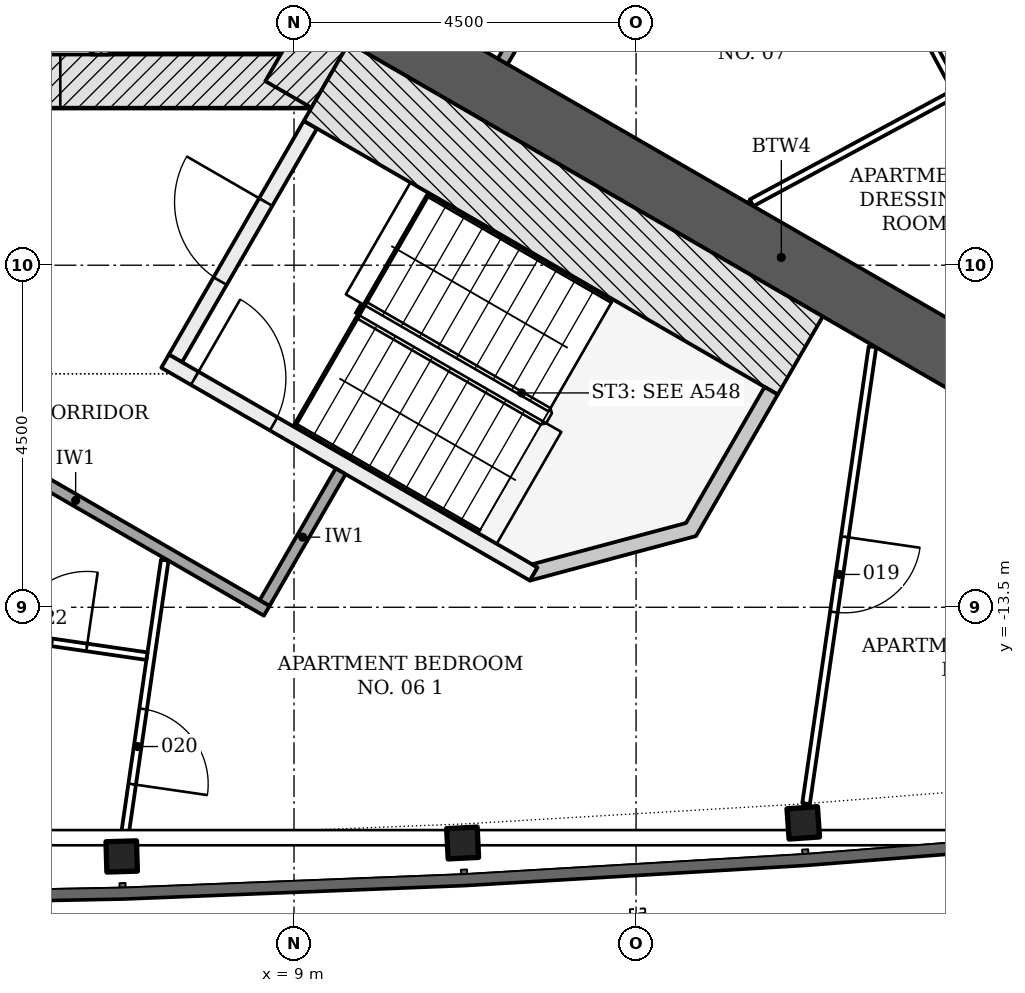
"""IFC4 building model, lengths in metres.
Left out: names, types, materials, properties, quantities, classifications, styles, units other than length and angle.
Written with IfcOpenShell. Run it as: python <this file> out.ifc"""

import sys

from ifc_helpers import new_model, si_unit, direction, frame, frame_2d, origin, origin_2d, place, context, subcontext, project, spatial, polyline, rectangle, i_section, outline, extrude, element, fill, save


model = new_model("IFC4")
c1 = context("Model", 3, precision=1e-05, world=origin(), true_north=direction((0.0, 1.0)))
c2 = subcontext(c1, "Body", "Model", "MODEL_VIEW")
j1 = project(units=[si_unit("LENGTHUNIT", "METRE"), si_unit("PLANEANGLEUNIT", "RADIAN")], contexts=[c1])
p1 = place(None, origin())
s1 = spatial("IfcSite", under=j1, at=p1, CompositionType="ELEMENT")
p2 = place(p1, origin())
s2 = spatial("IfcBuilding", under=s1, at=p2, CompositionType="ELEMENT")
p3 = place(p2, frame((0.0, 0.0, 91.5)))
s3 = spatial("IfcBuildingStorey", under=s2, at=p3, CompositionType="ELEMENT", Elevation=91.5)
p4 = place(p3, frame((-9.229, -6.578, -0.2), z_axis=(0.0, 0.0, 1.0), x_axis=(1.0, 0.0, 0.0)))
e1 = element("IfcWall", 1, at=p4, inside=s3, PredefinedType="SHEAR", context=c2, shape_type="SweptSolid", body=[
    extrude(rectangle(XDim=18.458, YDim=0.7, at=frame_2d((9.229, 0.0))), origin(), (0.0, 0.0, 1.0), 3.6),
])
p5 = place(p4, frame((3.304, 0.0, 0.2)))
e2 = element("IfcOpeningElement", 2, at=p5, cuts=e1, PredefinedType="OPENING", context=c2, shape_type="SweptSolid", body=[
    extrude(rectangle(XDim=1.1, YDim=2.1, at=frame_2d((0.55, 1.05))), frame((0.0, 0.36, 0.0), z_axis=(0.0, -1.0, 0.0), x_axis=(1.0, 0.0, 0.0)), (0.0, 0.0, 1.0), 0.72),
])
p6 = place(p4, frame((5.454, 0.0, 0.2)))
e3 = element("IfcOpeningElement", 3, at=p6, cuts=e1, PredefinedType="OPENING", context=c2, shape_type="SweptSolid", body=[
    extrude(rectangle(XDim=1.1, YDim=2.1, at=frame_2d((0.55, 1.05))), frame((0.0, 0.36, 0.0), z_axis=(0.0, -1.0, 0.0), x_axis=(1.0, 0.0, 0.0)), (0.0, 0.0, 1.0), 0.72),
])
p7 = place(p4, frame((7.604, 0.0, 0.2)))
e4 = element("IfcOpeningElement", 4, at=p7, cuts=e1, PredefinedType="OPENING", context=c2, shape_type="SweptSolid", body=[
    extrude(rectangle(XDim=1.1, YDim=2.1, at=frame_2d((0.55, 1.05))), frame((0.0, 0.36, 0.0), z_axis=(0.0, -1.0, 0.0), x_axis=(1.0, 0.0, 0.0)), (0.0, 0.0, 1.0), 0.72),
])
p8 = place(p4, frame((9.754, 0.0, 0.2)))
e5 = element("IfcOpeningElement", 5, at=p8, cuts=e1, PredefinedType="OPENING", context=c2, shape_type="SweptSolid", body=[
    extrude(rectangle(XDim=1.1, YDim=2.1, at=frame_2d((0.55, 1.05))), frame((0.0, 0.36, 0.0), z_axis=(0.0, -1.0, 0.0), x_axis=(1.0, 0.0, 0.0)), (0.0, 0.0, 1.0), 0.72),
])
p9 = place(p4, frame((11.904, 0.0, 0.2)))
e6 = element("IfcOpeningElement", 6, at=p9, cuts=e1, PredefinedType="OPENING", context=c2, shape_type="SweptSolid", body=[
    extrude(rectangle(XDim=1.1, YDim=2.1, at=frame_2d((0.55, 1.05))), frame((0.0, 0.36, 0.0), z_axis=(0.0, -1.0, 0.0), x_axis=(1.0, 0.0, 0.0)), (0.0, 0.0, 1.0), 0.72),
])
p10 = place(p4, frame((14.054, 0.0, 0.2)))
e7 = element("IfcOpeningElement", 7, at=p10, cuts=e1, PredefinedType="OPENING", context=c2, shape_type="SweptSolid", body=[
    extrude(rectangle(XDim=1.1, YDim=2.1, at=frame_2d((0.55, 1.05))), frame((0.0, 0.36, 0.0), z_axis=(0.0, -1.0, 0.0), x_axis=(1.0, 0.0, 0.0)), (0.0, 0.0, 1.0), 0.72),
])
p11 = place(p4, frame((1.079, 0.0, 0.2)))
e8 = element("IfcOpeningElement", 8, at=p11, cuts=e1, PredefinedType="OPENING", context=c2, shape_type="SweptSolid", body=[
    extrude(rectangle(XDim=0.9, YDim=2.1, at=frame_2d((0.45, 1.05))), frame((0.0, 0.36, 0.0), z_axis=(0.0, -1.0, 0.0), x_axis=(1.0, 0.0, 0.0)), (0.0, 0.0, 1.0), 0.72),
])
p12 = place(p3, frame((8.926, -6.753, -0.2), z_axis=(0.0, 0.0, 1.0), x_axis=(0.500042739161, 0.866000726912, 0.0)))
e9 = element("IfcWall", 9, at=p12, inside=s3, PredefinedType="SHEAR", context=c2, shape_type="SweptSolid", body=[
    extrude(rectangle(XDim=2.771, YDim=0.7, at=frame_2d((1.386, 0.0))), origin(), (0.0, 0.0, 1.0), 3.6),
])
p13 = place(p3, frame((9.922, -5.728, -0.2), z_axis=(0.0, 0.0, 1.0), x_axis=(0.866029086277, -0.499993621681, 0.0)))
e10 = element("IfcWall", 10, at=p13, inside=s3, PredefinedType="SHEAR", context=c2, shape_type="SweptSolid", body=[
    extrude(rectangle(XDim=12.677, YDim=0.8, at=frame_2d((6.339, 0.0))), origin(), (0.0, 0.0, 1.0), 3.6),
])
for number, where, z_axis, x_axis in (
    (11, (6.733, -16.778, -0.2), (0.0, 0.0, 1.0), (1.0, 0.03, 0.0)),
    (12, (11.219, -16.601, -0.2), (0.0, 0.0, 1.0), (0.999, 0.049, 0.0)),
    (13, (15.7, -16.336, -0.2), (0.0, 0.0, 1.0), (0.998, 0.069, 0.0)),
):
    element("IfcColumn", number, at=place(p3, frame(where, z_axis=z_axis, x_axis=x_axis)), inside=s3, PredefinedType="COLUMN", context=c2, shape_type="SweptSolid", body=[
        extrude(i_section(OverallWidth=0.401, OverallDepth=0.399, WebThickness=0.025, FlangeThickness=0.04, FilletRadius=0.015, at=origin_2d()), origin(), (0.0, 0.0, 1.0), 3.6),
    ])
p14 = place(p3, frame((6.45, -6.228, -0.2), z_axis=(0.0, 0.0, 1.0), x_axis=(0.0, 1.0, 0.0)))
e14 = element("IfcWall", 14, at=p14, inside=s3, PredefinedType="PARTITIONING", context=c2, shape_type="SweptSolid", body=[
    extrude(rectangle(XDim=2.5, YDim=0.25, at=frame_2d((1.25, 0.0))), origin(), (0.0, 0.0, 1.0), 3.6),
])
p15 = place(p3, frame((7.44, -10.226, -0.2), z_axis=(0.0, 0.0, 1.0), x_axis=(0.500022077904, 0.866012656725, 0.0)))
e15 = element("IfcWall", 15, at=p15, inside=s3, PredefinedType="SHEAR", context=c2, shape_type="SweptSolid", body=[
    extrude(rectangle(XDim=3.55, YDim=0.2, at=frame_2d((1.775, 0.0))), origin(), (0.0, 0.0, 1.0), 3.6),
])
p16 = place(p15, frame((1.175, 0.0, 0.2)))
e16 = element("IfcOpeningElement", 16, at=p16, cuts=e15, PredefinedType="OPENING", context=c2, shape_type="SweptSolid", body=[
    extrude(rectangle(XDim=1.2, YDim=2.1, at=frame_2d((0.6, 1.05))), frame((0.0, 0.11, 0.0), z_axis=(0.0, -1.0, 0.0), x_axis=(1.0, 0.0, 0.0)), (0.0, 0.0, 1.0), 0.22),
])
p17 = place(p3, frame((7.304, -10.262, -0.2), z_axis=(0.0, 0.0, 1.0), x_axis=(0.866026594901, -0.49999793692, 0.0)))
e17 = element("IfcWall", 17, at=p17, inside=s3, PredefinedType="SHEAR", context=c2, shape_type="SweptSolid", body=[
    extrude(rectangle(XDim=5.6, YDim=0.2, at=frame_2d((2.8, 0.0))), origin(), (0.0, 0.0, 1.0), 3.6),
])
p18 = place(p17, frame((0.45, 0.0, 0.2)))
e18 = element("IfcOpeningElement", 18, at=p18, cuts=e17, PredefinedType="OPENING", context=c2, shape_type="SweptSolid", body=[
    extrude(rectangle(XDim=1.2, YDim=2.1, at=frame_2d((0.6, 1.05))), frame((0.0, 0.11, 0.0), z_axis=(0.0, -1.0, 0.0), x_axis=(1.0, 0.0, 0.0)), (0.0, 0.0, 1.0), 0.22),
])
p19 = place(p3, frame((9.425, -6.588, -0.2), z_axis=(0.0, 0.0, 1.0), x_axis=(0.866018442252, -0.500012057535, 0.0)))
e19 = element("IfcWall", 19, at=p19, inside=s3, PredefinedType="SHEAR", context=c2, shape_type="SweptSolid", body=[
    extrude(rectangle(XDim=7.2, YDim=1.186, at=frame_2d((3.6, 0.0))), origin(), (0.0, 0.0, 1.0), 3.6),
])
p20 = place(p3, frame((0.0, 0.0, -0.2)))
e20 = element("IfcWall", 20, at=p20, inside=s3, PredefinedType="SHEAR", context=c2, shape_type="SweptSolid", body=[
    extrude(outline(polyline([(12.104, -13.149), (14.289, -12.563), (15.364, -10.701), (15.191, -10.601), (14.157, -12.392), (12.132, -12.934), (12.204, -12.976), (12.204, -12.976), (12.204, -12.976), (12.204, -12.976), (12.204, -12.976), (12.204, -12.976), (12.204, -12.976), (12.204, -12.976), (12.204, -12.976), (12.204, -12.976), (12.204, -12.976), (12.204, -12.976), (12.204, -12.976), (12.204, -12.976), (12.204, -12.976), (12.204, -12.976), (12.204, -12.976), (12.104, -13.149)])), origin(), (0.0, 0.0, 1.0), 3.6),
])
p21 = place(p3, frame((3.613, -10.643, 0.0), z_axis=(0.0, 0.0, 1.0), x_axis=(0.866042728627, -0.499969991291, 0.0)))
e21 = element("IfcWall", 21, at=p21, inside=s3, PredefinedType="PARTITIONING", context=c2, shape_type="SweptSolid", body=[
    extrude(rectangle(XDim=5.805, YDim=0.15, at=frame_2d((2.903, 0.0))), origin(), (0.0, 0.0, 1.0), 2.778),
])
p22 = place(p3, frame((8.614, -13.444, 0.0), z_axis=(0.0, 0.0, 1.0), x_axis=(0.499972520799, 0.866041268327, 0.0)))
e22 = element("IfcWall", 22, at=p22, inside=s3, PredefinedType="PARTITIONING", context=c2, shape_type="SweptSolid", body=[
    extrude(rectangle(XDim=2.0, YDim=0.15, at=frame_2d((1.0, 0.0))), origin(), (0.0, 0.0, 1.0), 3.4),
])
p23 = place(p3, frame((11.745, -6.319, 0.0), z_axis=(0.0, 0.0, 1.0), x_axis=(0.500012721296, 0.866018059016, 0.0)))
e23 = element("IfcWall", 23, at=p23, inside=s3, PredefinedType="PARTITIONING", context=c2, shape_type="SweptSolid", body=[
    extrude(rectangle(XDim=1.966, YDim=0.15, at=frame_2d((0.983, 0.0))), origin(), (0.0, 0.0, 1.0), 2.778),
])
p24 = place(p3, frame((20.073, -11.078, 0.0), z_axis=(0.0, 0.0, 1.0), x_axis=(-0.474207115322, 0.880413318719, 0.0)))
e24 = element("IfcWall", 24, at=p24, inside=s3, PredefinedType="PARTITIONING", context=c2, shape_type="SweptSolid", body=[
    extrude(rectangle(XDim=8.548, YDim=0.1, at=frame_2d((4.274, 0.0))), origin(), (0.0, 0.0, 1.0), 2.778),
])
p25 = place(p24, frame((1.949, 0.0, 0.0)))
e25 = element("IfcOpeningElement", 25, at=p25, cuts=e24, PredefinedType="OPENING", context=c2, shape_type="SweptSolid", body=[
    extrude(rectangle(XDim=1.0, YDim=2.1, at=frame_2d((0.5, 1.05))), frame((0.0, 0.06, 0.0), z_axis=(0.0, -1.0, 0.0), x_axis=(1.0, 0.0, 0.0)), (0.0, 0.0, 1.0), 0.12),
])
p26 = place(p3, frame((16.61, -10.073, 0.0), z_axis=(0.0, 0.0, 1.0), x_axis=(-0.143841065588, -0.989600802269, 0.0)))
e26 = element("IfcWall", 26, at=p26, inside=s3, PredefinedType="PARTITIONING", context=c2, shape_type="SweptSolid", body=[
    extrude(rectangle(XDim=6.073, YDim=0.1, at=frame_2d((3.037, 0.0))), origin(), (0.0, 0.0, 1.0), 2.923),
])
p27 = place(p26, frame((2.526, 0.0, 0.0)))
e27 = element("IfcOpeningElement", 27, at=p27, cuts=e26, PredefinedType="OPENING", context=c2, shape_type="SweptSolid", body=[
    extrude(rectangle(XDim=1.0, YDim=2.1, at=frame_2d((0.5, 1.05))), frame((0.0, 0.06, 0.0), z_axis=(0.0, -1.0, 0.0), x_axis=(1.0, 0.0, 0.0)), (0.0, 0.0, 1.0), 0.12),
])
p28 = place(p3, frame((7.3, -12.879, 0.0), z_axis=(0.0, 0.0, 1.0), x_axis=(-0.14388794615, -0.989593986922, 0.0)))
e28 = element("IfcWall", 28, at=p28, inside=s3, PredefinedType="PARTITIONING", context=c2, shape_type="SweptSolid", body=[
    extrude(rectangle(XDim=3.685, YDim=0.1, at=frame_2d((1.843, 0.0))), origin(), (0.0, 0.0, 1.0), 2.778),
])
p29 = place(p28, frame((1.979, 0.0, 0.0)))
e29 = element("IfcOpeningElement", 29, at=p29, cuts=e28, PredefinedType="OPENING", context=c2, shape_type="SweptSolid", body=[
    extrude(rectangle(XDim=1.0, YDim=2.1, at=frame_2d((0.5, 1.05))), frame((0.0, 0.06, 0.0), z_axis=(0.0, -1.0, 0.0), x_axis=(1.0, 0.0, 0.0)), (0.0, 0.0, 1.0), 0.12),
])
p30 = place(p3, frame((17.682, -6.745, 0.0), z_axis=(0.0, 0.0, 1.0), x_axis=(-0.880419251007, -0.474196101267, 0.0)))
e30 = element("IfcWall", 30, at=p30, inside=s3, PredefinedType="PARTITIONING", context=c2, shape_type="SweptSolid", body=[
    extrude(rectangle(XDim=3.024, YDim=0.1, at=frame_2d((1.512, 0.0))), origin(), (0.0, 0.0, 1.0), 3.4),
])
p31 = place(p3, frame((4.443, -13.762, 0.0), z_axis=(0.0, 0.0, 1.0), x_axis=(0.989603850573, -0.143820092239, 0.0)))
e31 = element("IfcWall", 31, at=p31, inside=s3, PredefinedType="PARTITIONING", context=c2, shape_type="SweptSolid", body=[
    extrude(rectangle(XDim=2.65, YDim=0.1, at=frame_2d((1.325, 0.0))), origin(), (0.0, 0.0, 1.0), 2.778),
])
p32 = place(p31, frame((0.85, 0.0, 0.0)))
e32 = element("IfcOpeningElement", 32, at=p32, cuts=e31, PredefinedType="OPENING", context=c2, shape_type="SweptSolid", body=[
    extrude(rectangle(XDim=1.0, YDim=2.1, at=frame_2d((0.5, 1.05))), frame((0.0, 0.06, 0.0), z_axis=(0.0, -1.0, 0.0), x_axis=(1.0, 0.0, 0.0)), (0.0, 0.0, 1.0), 0.12),
])
p33 = place(p10, origin())
e33 = element("IfcDoor", 33, at=p33, inside=s3, OperationType="DOUBLE_DOOR_SLIDING", PredefinedType="DOOR", context=c2, shape_type="SweptSolid", body=[
    extrude(rectangle(XDim=1.1, YDim=2.1, at=frame_2d((0.55, 1.05))), frame((0.0, 0.025, 0.0), z_axis=(0.0, -1.0, 0.0), x_axis=(1.0, 0.0, 0.0)), (0.0, 0.0, 1.0), 0.05),
])
fill(e7, e33)
p34 = place(p16, origin())
e34 = element("IfcDoor", 34, at=p34, inside=s3, OperationType="SINGLE_SWING_RIGHT", PredefinedType="DOOR", context=c2, shape_type="SweptSolid", body=[
    extrude(rectangle(XDim=1.2, YDim=2.1, at=frame_2d((0.6, 1.05))), frame((0.0, 0.025, 0.0), z_axis=(0.0, -1.0, 0.0), x_axis=(1.0, 0.0, 0.0)), (0.0, 0.0, 1.0), 0.05),
])
fill(e16, e34)
p35 = place(p18, origin())
e35 = element("IfcDoor", 35, at=p35, inside=s3, OperationType="SINGLE_SWING_LEFT", PredefinedType="DOOR", context=c2, shape_type="SweptSolid", body=[
    extrude(rectangle(XDim=1.2, YDim=2.1, at=frame_2d((0.6, 1.05))), frame((0.0, 0.025, 0.0), z_axis=(0.0, -1.0, 0.0), x_axis=(1.0, 0.0, 0.0)), (0.0, 0.0, 1.0), 0.05),
])
fill(e18, e35)
p36 = place(p27, origin())
e36 = element("IfcDoor", 36, at=p36, inside=s3, OperationType="SINGLE_SWING_LEFT", PredefinedType="DOOR", context=c2, shape_type="SweptSolid", body=[
    extrude(rectangle(XDim=1.0, YDim=2.1, at=frame_2d((0.5, 1.05))), frame((0.0, 0.025, 0.0), z_axis=(0.0, -1.0, 0.0), x_axis=(1.0, 0.0, 0.0)), (0.0, 0.0, 1.0), 0.05),
])
fill(e27, e36)
p37 = place(p29, origin())
e37 = element("IfcDoor", 37, at=p37, inside=s3, OperationType="SINGLE_SWING_RIGHT", PredefinedType="DOOR", context=c2, shape_type="SweptSolid", body=[
    extrude(rectangle(XDim=1.0, YDim=2.1, at=frame_2d((0.5, 1.05))), frame((0.0, 0.025, 0.0), z_axis=(0.0, -1.0, 0.0), x_axis=(1.0, 0.0, 0.0)), (0.0, 0.0, 1.0), 0.05),
])
fill(e29, e37)
p38 = place(p32, origin())
e38 = element("IfcDoor", 38, at=p38, inside=s3, OperationType="SINGLE_SWING_RIGHT", PredefinedType="DOOR", context=c2, shape_type="SweptSolid", body=[
    extrude(rectangle(XDim=1.0, YDim=2.1, at=frame_2d((0.5, 1.05))), frame((0.0, 0.025, 0.0), z_axis=(0.0, -1.0, 0.0), x_axis=(1.0, 0.0, 0.0)), (0.0, 0.0, 1.0), 0.05),
])
fill(e32, e38)
save(model, sys.argv[1])
